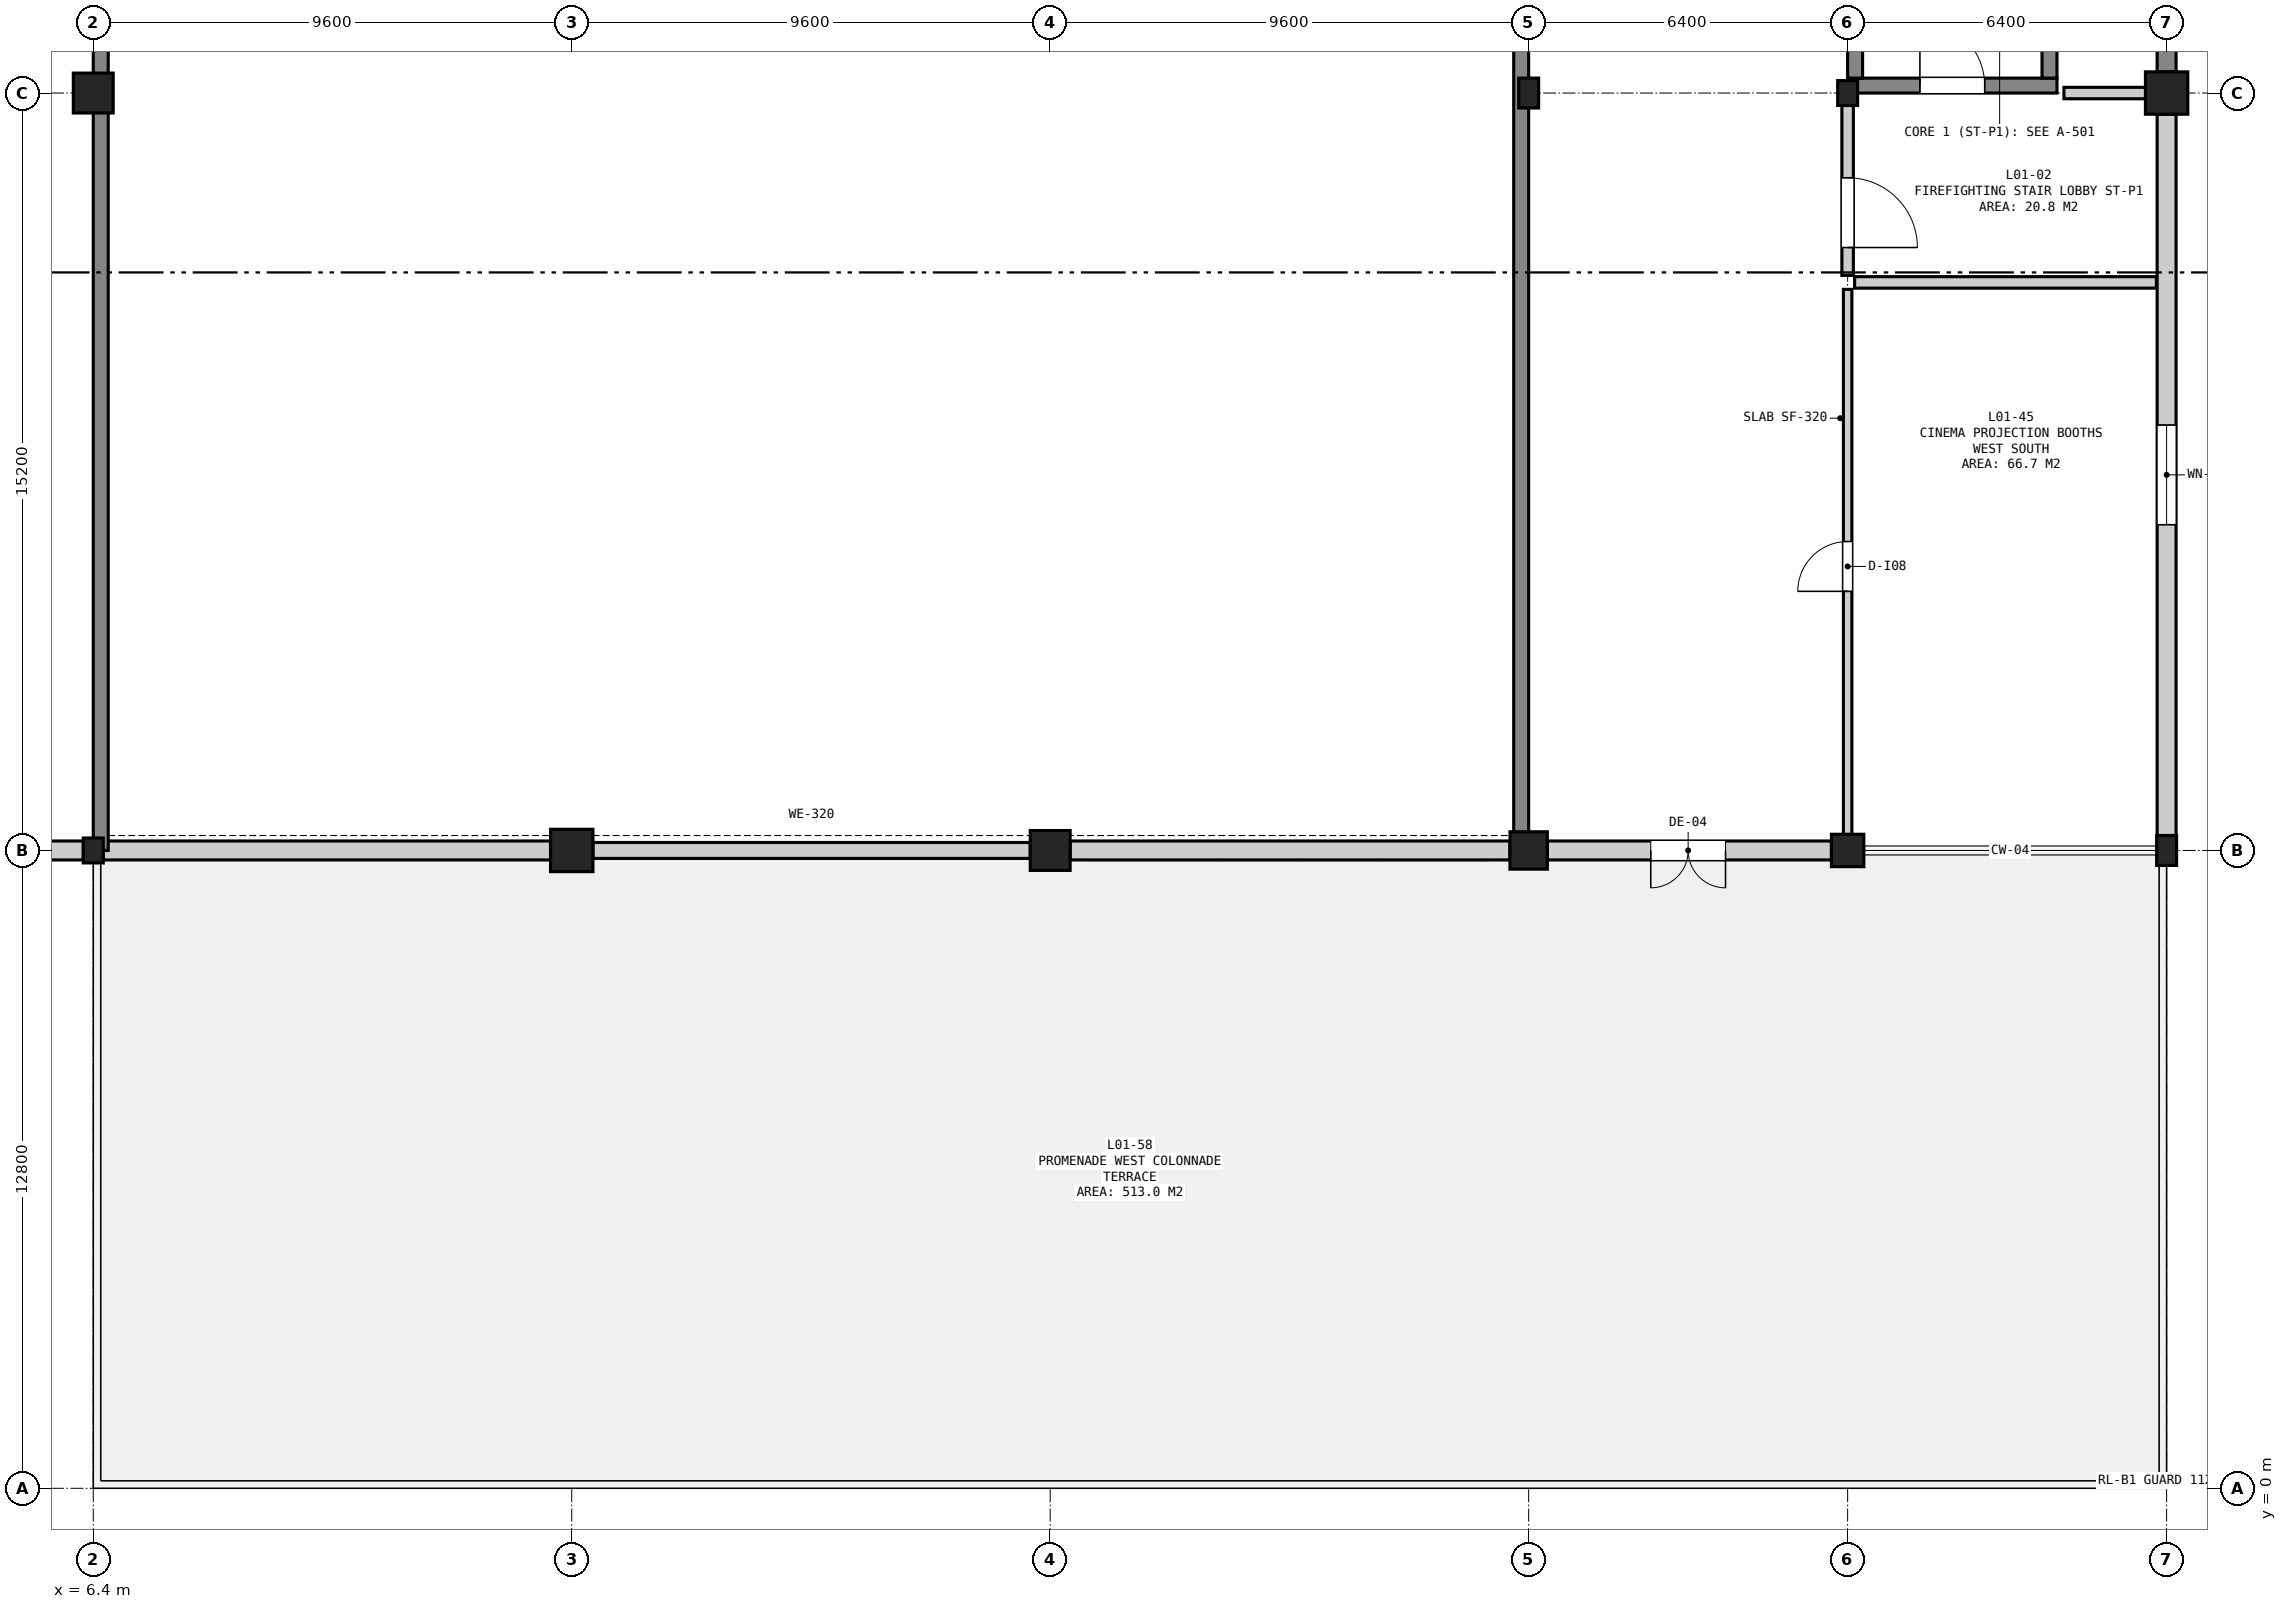
"""IFC4 building model, lengths in metres.
Left out: names, types, materials, properties, quantities, classifications, styles, units other than length and angle.
Written with IfcOpenShell. Run it as: python <this file> out.ifc"""

import sys

from ifc_helpers import new_model, si_unit, direction, frame, frame_2d, origin, origin_2d, place, context, subcontext, project, spatial, rectangle, extrude, element, fill, save


model = new_model("IFC4")
c1 = context("Model", 3, precision=1e-05, world=origin(), true_north=direction((0.0, 1.0)))
c2 = subcontext(c1, "Body", "Model", "MODEL_VIEW")
j1 = project(units=[si_unit("LENGTHUNIT", "METRE"), si_unit("PLANEANGLEUNIT", "RADIAN")], contexts=[c1])
p1 = place(None, origin())
s1 = spatial("IfcSite", under=j1, at=p1, CompositionType="ELEMENT")
p2 = place(p1, origin())
s2 = spatial("IfcBuilding", under=s1, at=p2, CompositionType="ELEMENT")
p3 = place(p2, frame((0.0, 0.0, 5.4)))
s3 = spatial("IfcBuildingStorey", under=s2, at=p3, CompositionType="ELEMENT", Elevation=5.4)
p4 = place(p3, frame((6.4, 12.8, 0.0), z_axis=(0.0, 0.0, 1.0), x_axis=(1.0, 0.0, 0.0)))
e1 = element("IfcColumn", 1, at=p4, inside=s3, PredefinedType="COLUMN", context=c2, shape_type="SweptSolid", body=[
    extrude(rectangle(XDim=0.4, YDim=0.5, at=origin_2d()), origin(), (0.0, 0.0, 1.0), 5.4),
])
p5 = place(p3, frame((6.4, 28.0, 0.0), z_axis=(0.0, 0.0, 1.0), x_axis=(1.0, 0.0, 0.0)))
e2 = element("IfcColumn", 2, at=p5, inside=s3, PredefinedType="COLUMN", context=c2, shape_type="SweptSolid", body=[
    extrude(rectangle(XDim=0.8, YDim=0.8, at=origin_2d()), origin(), (0.0, 0.0, 1.0), 5.4),
])
p6 = place(p3, frame((16.0, 12.8, 0.0), z_axis=(0.0, 0.0, 1.0), x_axis=(1.0, 0.0, 0.0)))
e3 = element("IfcColumn", 3, at=p6, inside=s3, PredefinedType="COLUMN", context=c2, shape_type="SweptSolid", body=[
    extrude(rectangle(XDim=0.85, YDim=0.85, at=origin_2d()), origin(), (0.0, 0.0, 1.0), 5.4),
])
p7 = place(p3, frame((25.6, 12.8, 0.0), z_axis=(0.0, 0.0, 1.0), x_axis=(1.0, 0.0, 0.0)))
e4 = element("IfcColumn", 4, at=p7, inside=s3, PredefinedType="COLUMN", context=c2, shape_type="SweptSolid", body=[
    extrude(rectangle(XDim=0.8, YDim=0.8, at=origin_2d()), origin(), (0.0, 0.0, 1.0), 5.4),
])
p8 = place(p3, frame((35.2, 12.8, 0.0), z_axis=(0.0, 0.0, 1.0), x_axis=(1.0, 0.0, 0.0)))
e5 = element("IfcColumn", 5, at=p8, inside=s3, PredefinedType="COLUMN", context=c2, shape_type="SweptSolid", body=[
    extrude(rectangle(XDim=0.75, YDim=0.75, at=origin_2d()), origin(), (0.0, 0.0, 1.0), 5.4),
])
p9 = place(p3, frame((35.2, 28.0, 0.0), z_axis=(0.0, 0.0, 1.0), x_axis=(1.0, 0.0, 0.0)))
e6 = element("IfcColumn", 6, at=p9, inside=s3, PredefinedType="COLUMN", context=c2, shape_type="SweptSolid", body=[
    extrude(rectangle(XDim=0.4, YDim=0.6, at=origin_2d()), origin(), (0.0, 0.0, 1.0), 5.4),
])
p10 = place(p3, frame((41.6, 12.8, 0.0), z_axis=(0.0, 0.0, 1.0), x_axis=(1.0, 0.0, 0.0)))
e7 = element("IfcColumn", 7, at=p10, inside=s3, PredefinedType="COLUMN", context=c2, shape_type="SweptSolid", body=[
    extrude(rectangle(XDim=0.65, YDim=0.65, at=origin_2d()), origin(), (0.0, 0.0, 1.0), 5.4),
])
p11 = place(p3, frame((41.6, 28.0, 0.0), z_axis=(0.0, 0.0, 1.0), x_axis=(1.0, 0.0, 0.0)))
e8 = element("IfcColumn", 8, at=p11, inside=s3, PredefinedType="COLUMN", context=c2, shape_type="SweptSolid", body=[
    extrude(rectangle(XDim=0.4, YDim=0.5, at=origin_2d()), origin(), (0.0, 0.0, 1.0), 5.4),
])
p12 = place(p3, frame((48.0, 12.8, 0.0), z_axis=(0.0, 0.0, 1.0), x_axis=(1.0, 0.0, 0.0)))
e9 = element("IfcColumn", 9, at=p12, inside=s3, PredefinedType="COLUMN", context=c2, shape_type="SweptSolid", body=[
    extrude(rectangle(XDim=0.4, YDim=0.6, at=origin_2d()), origin(), (0.0, 0.0, 1.0), 5.4),
])
p13 = place(p3, frame((48.0, 28.0, 0.0), z_axis=(0.0, 0.0, 1.0), x_axis=(1.0, 0.0, 0.0)))
e10 = element("IfcColumn", 10, at=p13, inside=s3, PredefinedType="COLUMN", context=c2, shape_type="SweptSolid", body=[
    extrude(rectangle(XDim=0.85, YDim=0.85, at=origin_2d()), origin(), (0.0, 0.0, 1.0), 5.4),
])
p14 = place(p3, frame((0.2, 12.8, 0.0), z_axis=(0.0, 0.0, 1.0), x_axis=(1.0, 0.0, 0.0)))
e11 = element("IfcWall", 11, at=p14, inside=s3, PredefinedType="SOLIDWALL", context=c2, shape_type="SweptSolid", body=[
    extrude(rectangle(XDim=6.0, YDim=0.38, at=frame_2d((3.0, 0.0))), origin(), (0.0, 0.0, 1.0), 4.44),
])
p15 = place(p14, frame((2.325, 0.0, 0.9)))
e12 = element("IfcOpeningElement", 12, at=p15, cuts=e11, PredefinedType="OPENING", context=c2, shape_type="SweptSolid", body=[
    extrude(rectangle(XDim=1.35, YDim=1.75, at=frame_2d((0.675, 0.875))), frame((0.0, 0.202, 0.0), z_axis=(0.0, -1.0, 0.0), x_axis=(1.0, 0.0, 0.0)), (0.0, 0.0, 1.0), 0.404),
])
p16 = place(p3, frame((6.6, 12.8, 0.0), z_axis=(0.0, 0.0, 1.0), x_axis=(1.0, 0.0, 0.0)))
e13 = element("IfcWall", 13, at=p16, inside=s3, PredefinedType="SOLIDWALL", context=c2, shape_type="SweptSolid", body=[
    extrude(rectangle(XDim=8.975, YDim=0.38, at=frame_2d((4.487, 0.0))), origin(), (0.0, 0.0, 1.0), 4.515),
])
p17 = place(p3, frame((16.425, 12.8, 0.0), z_axis=(0.0, 0.0, 1.0), x_axis=(1.0, 0.0, 0.0)))
e14 = element("IfcWall", 14, at=p17, inside=s3, PredefinedType="SOLIDWALL", context=c2, shape_type="SweptSolid", body=[
    extrude(rectangle(XDim=8.775, YDim=0.32, at=frame_2d((4.387, 0.0))), origin(), (0.0, 0.0, 1.0), 4.735),
])
p18 = place(p3, frame((26.0, 12.8, 0.0), z_axis=(0.0, 0.0, 1.0), x_axis=(1.0, 0.0, 0.0)))
e15 = element("IfcWall", 15, at=p18, inside=s3, PredefinedType="SOLIDWALL", context=c2, shape_type="SweptSolid", body=[
    extrude(rectangle(XDim=8.825, YDim=0.38, at=frame_2d((4.413, 0.0))), origin(), (0.0, 0.0, 1.0), 4.435),
])
p19 = place(p3, frame((35.575, 12.8, 0.0), z_axis=(0.0, 0.0, 1.0), x_axis=(1.0, 0.0, 0.0)))
e16 = element("IfcWall", 16, at=p19, inside=s3, PredefinedType="SOLIDWALL", context=c2, shape_type="SweptSolid", body=[
    extrude(rectangle(XDim=5.7, YDim=0.38, at=frame_2d((2.85, 0.0))), origin(), (0.0, 0.0, 1.0), 4.44),
])
p20 = place(p19, frame((2.075, 0.0, 0.0)))
e17 = element("IfcOpeningElement", 17, at=p20, cuts=e16, PredefinedType="OPENING", context=c2, shape_type="SweptSolid", body=[
    extrude(rectangle(XDim=1.5, YDim=2.2, at=frame_2d((0.75, 1.1))), frame((0.0, 0.202, 0.0), z_axis=(0.0, -1.0, 0.0), x_axis=(1.0, 0.0, 0.0)), (0.0, 0.0, 1.0), 0.404),
])
p21 = place(p3, frame((48.0, 13.1, 0.0), z_axis=(0.0, 0.0, 1.0), x_axis=(0.0, 1.0, 0.0)))
e18 = element("IfcWall", 18, at=p21, inside=s3, PredefinedType="SOLIDWALL", context=c2, shape_type="SweptSolid", body=[
    extrude(rectangle(XDim=14.475, YDim=0.38, at=frame_2d((7.237, 0.0))), origin(), (0.0, 0.0, 1.0), 4.025),
])
p22 = place(p21, frame((6.238, 0.0, 0.9)))
e19 = element("IfcOpeningElement", 19, at=p22, cuts=e18, PredefinedType="OPENING", context=c2, shape_type="SweptSolid", body=[
    extrude(rectangle(XDim=2.0, YDim=1.65, at=frame_2d((1.0, 0.825))), frame((0.0, 0.202, 0.0), z_axis=(0.0, -1.0, 0.0), x_axis=(1.0, 0.0, 0.0)), (0.0, 0.0, 1.0), 0.404),
])
p23 = place(p3, frame((48.0, 28.425, 0.0), z_axis=(0.0, 0.0, 1.0), x_axis=(0.0, 1.0, 0.0)))
e20 = element("IfcWall", 20, at=p23, inside=s3, PredefinedType="SOLIDWALL", context=c2, shape_type="SweptSolid", body=[
    extrude(rectangle(XDim=7.15, YDim=0.38, at=frame_2d((3.575, 0.0))), origin(), (0.0, 0.0, 1.0), 4.515),
])
for number, where, z_axis, x_axis in (
    (21, (6.55, 12.8, 0.0), (0.0, 0.0, 1.0), (0.0, 1.0, 0.0)),
    (22, (35.05, 12.8, 0.0), (0.0, 0.0, 1.0), (0.0, 1.0, 0.0)),
):
    element("IfcWall", number, at=place(p3, frame(where, z_axis=z_axis, x_axis=x_axis)), inside=s3, PredefinedType="SHEAR", context=c2, shape_type="SweptSolid", body=[
        extrude(rectangle(XDim=23.2, YDim=0.3, at=frame_2d((11.6, 0.0))), origin(), (0.0, 0.0, 1.0), 5.1),
    ])
p24 = place(p3, frame((41.6, 28.15, 0.0), z_axis=(0.0, 0.0, 1.0), x_axis=(1.0, 0.0, 0.0)))
e23 = element("IfcWall", 23, at=p24, inside=s3, PredefinedType="SHEAR", context=c2, shape_type="SweptSolid", body=[
    extrude(rectangle(XDim=4.2, YDim=0.3, at=frame_2d((2.1, 0.0))), origin(), (0.0, 0.0, 1.0), 5.1),
])
p25 = place(p24, frame((1.45, 0.0, 0.0)))
e24 = element("IfcOpeningElement", 24, at=p25, cuts=e23, PredefinedType="OPENING", context=c2, shape_type="SweptSolid", body=[
    extrude(rectangle(XDim=1.3, YDim=2.18, at=frame_2d((0.65, 1.09))), frame((0.0, 0.162, 0.0), z_axis=(0.0, -1.0, 0.0), x_axis=(1.0, 0.0, 0.0)), (0.0, 0.0, 1.0), 0.324),
])
for number, where, z_axis, x_axis in (
    (25, (41.75, 28.3, 0.0), (0.0, 0.0, 1.0), (0.0, 1.0, 0.0)),
    (26, (45.65, 28.3, 0.0), (0.0, 0.0, 1.0), (0.0, 1.0, 0.0)),
):
    element("IfcWall", number, at=place(p3, frame(where, z_axis=z_axis, x_axis=x_axis)), inside=s3, PredefinedType="SHEAR", context=c2, shape_type="SweptSolid", body=[
        extrude(rectangle(XDim=7.4, YDim=0.3, at=frame_2d((3.7, 0.0))), origin(), (0.0, 0.0, 1.0), 5.1),
    ])
p26 = place(p3, frame((41.74, 24.2, 0.0), z_axis=(0.0, 0.0, 1.0), x_axis=(1.0, 0.0, 0.0)))
e27 = element("IfcWall", 27, at=p26, inside=s3, PredefinedType="SOLIDWALL", context=c2, shape_type="SweptSolid", body=[
    extrude(rectangle(XDim=6.055, YDim=0.23, at=frame_2d((3.027, 0.0))), origin(), (0.0, 0.0, 1.0), 5.1),
])
p27 = place(p3, frame((45.94, 28.0, 0.0), z_axis=(0.0, 0.0, 1.0), x_axis=(1.0, 0.0, 0.0)))
e28 = element("IfcWall", 28, at=p27, inside=s3, PredefinedType="SOLIDWALL", context=c2, shape_type="SweptSolid", body=[
    extrude(rectangle(XDim=1.955, YDim=0.23, at=frame_2d((0.978, 0.0))), origin(), (0.0, 0.0, 1.0), 4.435),
])
p28 = place(p3, frame((41.6, 24.34, 0.0), z_axis=(0.0, 0.0, 1.0), x_axis=(0.0, 1.0, 0.0)))
e29 = element("IfcWall", 29, at=p28, inside=s3, PredefinedType="SOLIDWALL", context=c2, shape_type="SweptSolid", body=[
    extrude(rectangle(XDim=3.52, YDim=0.23, at=frame_2d((1.76, 0.0))), origin(), (0.0, 0.0, 1.0), 3.885),
])
p29 = place(p28, frame((0.56, 0.0, 0.0)))
e30 = element("IfcOpeningElement", 30, at=p29, cuts=e29, PredefinedType="OPENING", context=c2, shape_type="SweptSolid", body=[
    extrude(rectangle(XDim=1.4, YDim=2.2, at=frame_2d((0.7, 1.1))), frame((0.0, 0.127, 0.0), z_axis=(0.0, -1.0, 0.0), x_axis=(1.0, 0.0, 0.0)), (0.0, 0.0, 1.0), 0.254),
])
p30 = place(p3, frame((41.6, 13.005, 0.0), z_axis=(0.0, 0.0, 1.0), x_axis=(0.0, 1.0, 0.0)))
e31 = element("IfcWall", 31, at=p30, inside=s3, PredefinedType="PARTITIONING", context=c2, shape_type="SweptSolid", body=[
    extrude(rectangle(XDim=11.055, YDim=0.17, at=frame_2d((5.528, 0.0))), origin(), (0.0, 0.0, 1.0), 3.885),
])
p31 = place(p30, frame((4.995, 0.0, 0.0)))
e32 = element("IfcOpeningElement", 32, at=p31, cuts=e31, PredefinedType="OPENING", context=c2, shape_type="SweptSolid", body=[
    extrude(rectangle(XDim=1.0, YDim=2.15, at=frame_2d((0.5, 1.075))), frame((0.0, 0.097, 0.0), z_axis=(0.0, -1.0, 0.0), x_axis=(1.0, 0.0, 0.0)), (0.0, 0.0, 1.0), 0.194),
])
p32 = place(p20, frame((1.5, 0.0, 0.0), z_axis=(0.0, 0.0, 1.0), x_axis=(-1.0, 0.0, 0.0)))
e33 = element("IfcDoor", 33, at=p32, inside=s3, OperationType="DOUBLE_DOOR_SINGLE_SWING", PredefinedType="DOOR", context=c2, shape_type="SweptSolid", body=[
    extrude(rectangle(XDim=1.5, YDim=2.2, at=frame_2d((0.75, 1.1))), frame((0.0, 0.025, 0.0), z_axis=(0.0, -1.0, 0.0), x_axis=(1.0, 0.0, 0.0)), (0.0, 0.0, 1.0), 0.05),
])
fill(e17, e33)
p33 = place(p22, origin())
e34 = element("IfcWindow", 34, at=p33, inside=s3, PartitioningType="DOUBLE_PANEL_HORIZONTAL", PredefinedType="WINDOW", context=c2, shape_type="SweptSolid", body=[
    extrude(rectangle(XDim=2.0, YDim=1.65, at=frame_2d((1.0, 0.825))), frame((0.0, 0.03, 0.0), z_axis=(0.0, -1.0, 0.0), x_axis=(1.0, 0.0, 0.0)), (0.0, 0.0, 1.0), 0.06),
])
fill(e19, e34)
p34 = place(p25, origin())
e35 = element("IfcDoor", 35, at=p34, inside=s3, OperationType="SINGLE_SWING_LEFT", PredefinedType="DOOR", context=c2, shape_type="SweptSolid", body=[
    extrude(rectangle(XDim=1.3, YDim=2.18, at=frame_2d((0.65, 1.09))), frame((0.0, 0.025, 0.0), z_axis=(0.0, -1.0, 0.0), x_axis=(1.0, 0.0, 0.0)), (0.0, 0.0, 1.0), 0.05),
])
fill(e24, e35)
p35 = place(p29, frame((1.4, 0.0, 0.0), z_axis=(0.0, 0.0, 1.0), x_axis=(-1.0, 0.0, 0.0)))
e36 = element("IfcDoor", 36, at=p35, inside=s3, OperationType="SINGLE_SWING_RIGHT", PredefinedType="DOOR", context=c2, shape_type="SweptSolid", body=[
    extrude(rectangle(XDim=1.4, YDim=2.2, at=frame_2d((0.7, 1.1))), frame((0.0, 0.025, 0.0), z_axis=(0.0, -1.0, 0.0), x_axis=(1.0, 0.0, 0.0)), (0.0, 0.0, 1.0), 0.05),
])
fill(e30, e36)
p36 = place(p31, origin())
e37 = element("IfcDoor", 37, at=p36, inside=s3, OperationType="SINGLE_SWING_LEFT", PredefinedType="DOOR", context=c2, shape_type="SweptSolid", body=[
    extrude(rectangle(XDim=1.0, YDim=2.15, at=frame_2d((0.5, 1.075))), frame((0.0, 0.025, 0.0), z_axis=(0.0, -1.0, 0.0), x_axis=(1.0, 0.0, 0.0)), (0.0, 0.0, 1.0), 0.05),
])
fill(e32, e37)
save(model, sys.argv[1])
